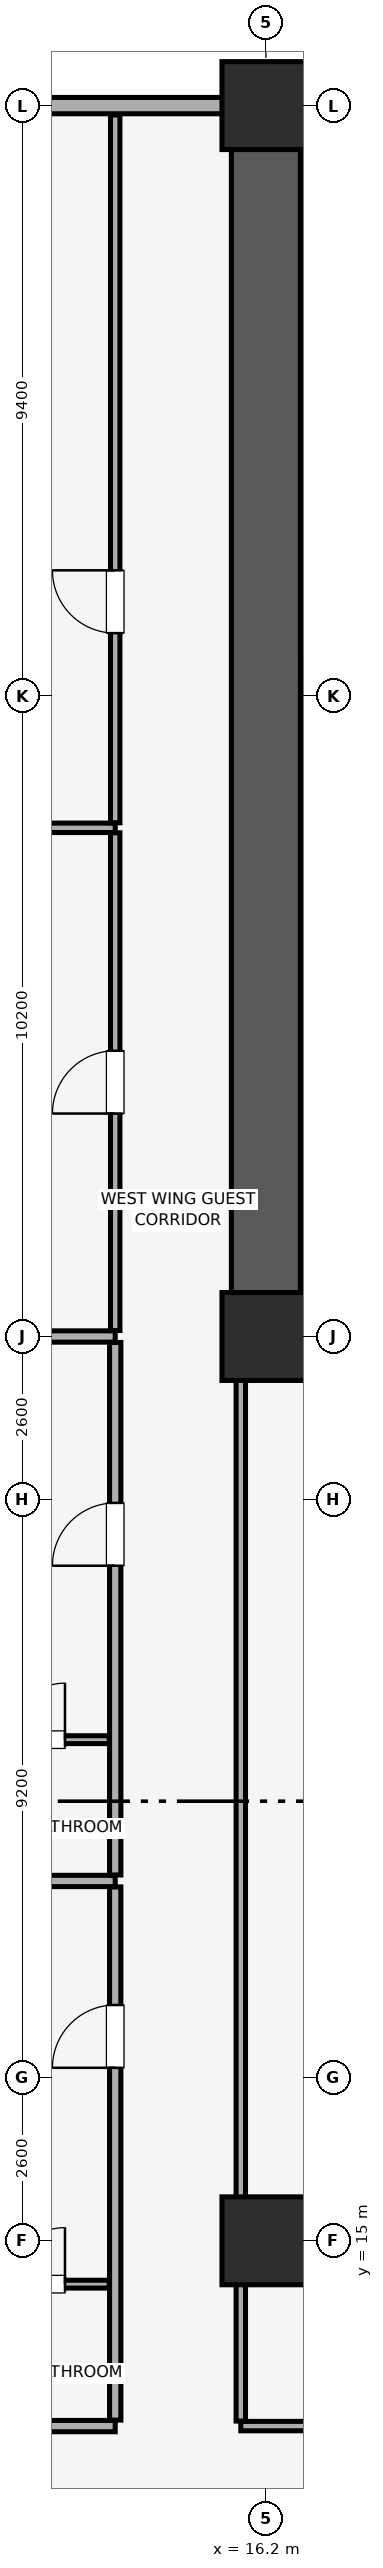
"""IFC4 building model, lengths in metres.
Left out: names, types, materials, properties, quantities, classifications, styles, units other than length and angle.
Written with IfcOpenShell. Run it as: python <this file> out.ifc"""

import sys

from ifc_helpers import new_model, si_unit, direction, frame, frame_2d, origin, origin_2d, place, context, subcontext, project, spatial, rectangle, extrude, element, fill, save


model = new_model("IFC4")
c1 = context("Model", 3, precision=1e-05, world=origin(), true_north=direction((0.0, 1.0)))
c2 = subcontext(c1, "Body", "Model", "MODEL_VIEW")
j1 = project(units=[si_unit("LENGTHUNIT", "METRE"), si_unit("PLANEANGLEUNIT", "RADIAN")], contexts=[c1])
p1 = place(None, origin())
s1 = spatial("IfcSite", under=j1, at=p1, CompositionType="ELEMENT")
p2 = place(p1, origin())
s2 = spatial("IfcBuilding", under=s1, at=p2, CompositionType="ELEMENT")
p3 = place(p2, frame((0.0, 0.0, 46.4)))
s3 = spatial("IfcBuildingStorey", under=s2, at=p3, CompositionType="ELEMENT", Elevation=46.4)
for number, where, z_axis, x_axis in (
    (1, (16.2, 15.0, 0.0), (0.0, 0.0, 1.0), (1.0, 0.0, 0.0)),
    (2, (16.2, 29.4, 0.0), (0.0, 0.0, 1.0), (1.0, 0.0, 0.0)),
    (3, (16.2, 49.0, 0.0), (0.0, 0.0, 1.0), (1.0, 0.0, 0.0)),
):
    element("IfcColumn", number, at=place(p3, frame(where, z_axis=z_axis, x_axis=x_axis)), inside=s3, PredefinedType="COLUMN", context=c2, shape_type="SweptSolid", body=[
        extrude(rectangle(XDim=1.4, YDim=1.4, at=origin_2d()), origin(), (0.0, 0.0, 1.0), 3.51),
    ])
p4 = place(p3, frame((79.8, 49.0, 0.0), z_axis=(0.0, 0.0, 1.0), x_axis=(-1.0, 0.0, 0.0)))
e4 = element("IfcWall", 4, at=p4, inside=s3, PredefinedType="SOLIDWALL", context=c2, shape_type="SweptSolid", body=[
    extrude(rectangle(XDim=75.6, YDim=0.26, at=frame_2d((37.8, 0.0))), origin(), (0.0, 0.0, 1.0), 2.56),
])
p5 = place(p4, frame((72.565, 0.0, 0.85)))
e5 = element("IfcOpeningElement", 5, at=p5, cuts=e4, PredefinedType="OPENING", context=c2, shape_type="SweptSolid", body=[
    extrude(rectangle(XDim=1.5, YDim=1.4, at=frame_2d((0.75, 0.7))), frame((0.0, 0.14, 0.0), z_axis=(0.0, -1.0, 0.0), x_axis=(1.0, 0.0, 0.0)), (0.0, 0.0, 1.0), 0.28),
])
p6 = place(p4, frame((67.45, 0.0, 0.85)))
e6 = element("IfcOpeningElement", 6, at=p6, cuts=e4, PredefinedType="OPENING", context=c2, shape_type="SweptSolid", body=[
    extrude(rectangle(XDim=1.5, YDim=1.4, at=frame_2d((0.75, 0.7))), frame((0.0, 0.14, 0.0), z_axis=(0.0, -1.0, 0.0), x_axis=(1.0, 0.0, 0.0)), (0.0, 0.0, 1.0), 0.28),
])
p7 = place(p4, frame((6.65, 0.0, 0.85)))
e7 = element("IfcOpeningElement", 7, at=p7, cuts=e4, PredefinedType="OPENING", context=c2, shape_type="SweptSolid", body=[
    extrude(rectangle(XDim=1.5, YDim=1.4, at=frame_2d((0.75, 0.7))), frame((0.0, 0.14, 0.0), z_axis=(0.0, -1.0, 0.0), x_axis=(1.0, 0.0, 0.0)), (0.0, 0.0, 1.0), 0.28),
])
p8 = place(p4, frame((1.535, 0.0, 0.85)))
e8 = element("IfcOpeningElement", 8, at=p8, cuts=e4, PredefinedType="OPENING", context=c2, shape_type="SweptSolid", body=[
    extrude(rectangle(XDim=1.5, YDim=1.4, at=frame_2d((0.75, 0.7))), frame((0.0, 0.14, 0.0), z_axis=(0.0, -1.0, 0.0), x_axis=(1.0, 0.0, 0.0)), (0.0, 0.0, 1.0), 0.28),
])
p9 = place(p4, frame((51.365, 0.0, 0.9)))
e9 = element("IfcOpeningElement", 9, at=p9, cuts=e4, PredefinedType="OPENING", context=c2, shape_type="SweptSolid", body=[
    extrude(rectangle(XDim=1.5, YDim=1.4, at=frame_2d((0.75, 0.7))), frame((0.0, 0.14, 0.0), z_axis=(0.0, -1.0, 0.0), x_axis=(1.0, 0.0, 0.0)), (0.0, 0.0, 1.0), 0.28),
])
p10 = place(p4, frame((44.55, 0.0, 0.9)))
e10 = element("IfcOpeningElement", 10, at=p10, cuts=e4, PredefinedType="OPENING", context=c2, shape_type="SweptSolid", body=[
    extrude(rectangle(XDim=1.5, YDim=1.4, at=frame_2d((0.75, 0.7))), frame((0.0, 0.14, 0.0), z_axis=(0.0, -1.0, 0.0), x_axis=(1.0, 0.0, 0.0)), (0.0, 0.0, 1.0), 0.28),
])
p11 = place(p4, frame((28.1, 0.0, 0.9)))
e11 = element("IfcOpeningElement", 11, at=p11, cuts=e4, PredefinedType="OPENING", context=c2, shape_type="SweptSolid", body=[
    extrude(rectangle(XDim=1.5, YDim=1.4, at=frame_2d((0.75, 0.7))), frame((0.0, 0.14, 0.0), z_axis=(0.0, -1.0, 0.0), x_axis=(1.0, 0.0, 0.0)), (0.0, 0.0, 1.0), 0.28),
])
p12 = place(p4, frame((23.485, 0.0, 0.9)))
e12 = element("IfcOpeningElement", 12, at=p12, cuts=e4, PredefinedType="OPENING", context=c2, shape_type="SweptSolid", body=[
    extrude(rectangle(XDim=1.5, YDim=1.4, at=frame_2d((0.75, 0.7))), frame((0.0, 0.14, 0.0), z_axis=(0.0, -1.0, 0.0), x_axis=(1.0, 0.0, 0.0)), (0.0, 0.0, 1.0), 0.28),
])
p13 = place(p3, frame((16.2, 29.4, 0.0), z_axis=(0.0, 0.0, 1.0), x_axis=(0.0, 1.0, 0.0)))
e13 = element("IfcWall", 13, at=p13, inside=s3, PredefinedType="SHEAR", context=c2, shape_type="SweptSolid", body=[
    extrude(rectangle(XDim=19.2, YDim=1.1, at=frame_2d((9.6, 0.0))), origin(), (0.0, 0.0, 1.0), 3.51),
])
p14 = place(p3, frame((16.755, 29.4, 0.0), z_axis=(0.0, 0.0, 1.0), x_axis=(1.0, 0.0, 0.0)))
e14 = element("IfcWall", 14, at=p14, inside=s3, PredefinedType="SHEAR", context=c2, shape_type="SweptSolid", body=[
    extrude(rectangle(XDim=6.845, YDim=1.1, at=frame_2d((3.423, 0.0))), origin(), (0.0, 0.0, 1.0), 3.51),
])
p15 = place(p3, frame((16.755, 40.025, 0.0), z_axis=(0.0, 0.0, 1.0), x_axis=(1.0, 0.0, 0.0)))
e15 = element("IfcWall", 15, at=p15, inside=s3, PredefinedType="SHEAR", context=c2, shape_type="SweptSolid", body=[
    extrude(rectangle(XDim=4.1, YDim=0.35, at=frame_2d((2.05, 0.0))), origin(), (0.0, 0.0, 1.0), 3.51),
])
p16 = place(p15, frame((1.71, 0.0, 0.0)))
e16 = element("IfcOpeningElement", 16, at=p16, cuts=e15, PredefinedType="OPENING", context=c2, shape_type="SweptSolid", body=[
    extrude(rectangle(XDim=1.15, YDim=2.15, at=frame_2d((0.575, 1.075))), frame((0.0, 0.185, 0.0), z_axis=(0.0, -1.0, 0.0), x_axis=(1.0, 0.0, 0.0)), (0.0, 0.0, 1.0), 0.37),
])
p17 = place(p3, frame((15.8, 12.05, 0.0), z_axis=(0.0, 0.0, 1.0), x_axis=(1.0, 0.0, 0.0)))
e17 = element("IfcWall", 17, at=p17, inside=s3, PredefinedType="PARTITIONING", context=c2, shape_type="SweptSolid", body=[
    extrude(rectangle(XDim=9.2, YDim=0.15, at=frame_2d((4.6, 0.0))), origin(), (0.0, 0.0, 1.0), 3.51),
])
p18 = place(p17, frame((4.1, 0.0, 0.0)))
e18 = element("IfcOpeningElement", 18, at=p18, cuts=e17, PredefinedType="OPENING", context=c2, shape_type="SweptSolid", body=[
    extrude(rectangle(XDim=1.0, YDim=2.15, at=frame_2d((0.5, 1.075))), frame((0.0, 0.085, 0.0), z_axis=(0.0, -1.0, 0.0), x_axis=(1.0, 0.0, 0.0)), (0.0, 0.0, 1.0), 0.17),
])
p19 = place(p3, frame((15.8, 12.13, 0.0), z_axis=(0.0, 0.0, 1.0), x_axis=(0.0, 1.0, 0.0)))
e19 = element("IfcWall", 19, at=p19, inside=s3, PredefinedType="PARTITIONING", context=c2, shape_type="SweptSolid", body=[
    extrude(rectangle(XDim=17.26, YDim=0.15, at=frame_2d((8.63, 0.0))), origin(), (0.0, 0.0, 1.0), 3.51),
])
for number, where, z_axis, x_axis in (
    (20, (0.15, 12.05, 0.0), (0.0, 0.0, 1.0), (1.0, 0.0, 0.0)),
    (21, (0.15, 20.73, 0.0), (0.0, 0.0, 1.0), (1.0, 0.0, 0.0)),
):
    element("IfcWall", number, at=place(p3, frame(where, z_axis=z_axis, x_axis=x_axis)), inside=s3, PredefinedType="PARTITIONING", context=c2, shape_type="SweptSolid", body=[
        extrude(rectangle(XDim=13.65, YDim=0.18, at=frame_2d((6.825, 0.0))), origin(), (0.0, 0.0, 1.0), 3.51),
    ])
p20 = place(p3, frame((13.8, 12.145, 0.0), z_axis=(0.0, 0.0, 1.0), x_axis=(0.0, 1.0, 0.0)))
e22 = element("IfcWall", 22, at=p20, inside=s3, PredefinedType="PARTITIONING", context=c2, shape_type="SweptSolid", body=[
    extrude(rectangle(XDim=8.49, YDim=0.18, at=frame_2d((4.245, 0.0))), origin(), (0.0, 0.0, 1.0), 3.51),
])
p21 = place(p20, frame((5.61, 0.0, 0.0)))
e23 = element("IfcOpeningElement", 23, at=p21, cuts=e22, PredefinedType="OPENING", context=c2, shape_type="SweptSolid", body=[
    extrude(rectangle(XDim=1.0, YDim=2.15, at=frame_2d((0.5, 1.075))), frame((0.0, 0.1, 0.0), z_axis=(0.0, -1.0, 0.0), x_axis=(1.0, 0.0, 0.0)), (0.0, 0.0, 1.0), 0.2),
])
p22 = place(p3, frame((11.3, 14.31, 0.0), z_axis=(0.0, 0.0, 1.0), x_axis=(1.0, 0.0, 0.0)))
e24 = element("IfcWall", 24, at=p22, inside=s3, PredefinedType="PARTITIONING", context=c2, shape_type="SweptSolid", body=[
    extrude(rectangle(XDim=2.405, YDim=0.125, at=frame_2d((1.203, 0.0))), origin(), (0.0, 0.0, 1.0), 3.51),
])
p23 = place(p22, frame((0.8, 0.0, 0.0)))
e25 = element("IfcOpeningElement", 25, at=p23, cuts=e24, PredefinedType="OPENING", context=c2, shape_type="SweptSolid", body=[
    extrude(rectangle(XDim=0.9, YDim=2.1, at=frame_2d((0.45, 1.05))), frame((0.0, 0.073, 0.0), z_axis=(0.0, -1.0, 0.0), x_axis=(1.0, 0.0, 0.0)), (0.0, 0.0, 1.0), 0.145),
])
p24 = place(p3, frame((0.15, 29.4, 0.0), z_axis=(0.0, 0.0, 1.0), x_axis=(1.0, 0.0, 0.0)))
e26 = element("IfcWall", 26, at=p24, inside=s3, PredefinedType="PARTITIONING", context=c2, shape_type="SweptSolid", body=[
    extrude(rectangle(XDim=13.65, YDim=0.18, at=frame_2d((6.825, 0.0))), origin(), (0.0, 0.0, 1.0), 2.86),
])
p25 = place(p3, frame((13.8, 20.825, 0.0), z_axis=(0.0, 0.0, 1.0), x_axis=(0.0, 1.0, 0.0)))
e27 = element("IfcWall", 27, at=p25, inside=s3, PredefinedType="PARTITIONING", context=c2, shape_type="SweptSolid", body=[
    extrude(rectangle(XDim=8.48, YDim=0.18, at=frame_2d((4.24, 0.0))), origin(), (0.0, 0.0, 1.0), 3.51),
])
p26 = place(p25, frame((4.925, 0.0, 0.0)))
e28 = element("IfcOpeningElement", 28, at=p26, cuts=e27, PredefinedType="OPENING", context=c2, shape_type="SweptSolid", body=[
    extrude(rectangle(XDim=1.0, YDim=2.15, at=frame_2d((0.5, 1.075))), frame((0.0, 0.1, 0.0), z_axis=(0.0, -1.0, 0.0), x_axis=(1.0, 0.0, 0.0)), (0.0, 0.0, 1.0), 0.2),
])
p27 = place(p3, frame((11.3, 22.98, 0.0), z_axis=(0.0, 0.0, 1.0), x_axis=(1.0, 0.0, 0.0)))
e29 = element("IfcWall", 29, at=p27, inside=s3, PredefinedType="PARTITIONING", context=c2, shape_type="SweptSolid", body=[
    extrude(rectangle(XDim=2.405, YDim=0.125, at=frame_2d((1.203, 0.0))), origin(), (0.0, 0.0, 1.0), 3.51),
])
p28 = place(p27, frame((0.8, 0.0, 0.0)))
e30 = element("IfcOpeningElement", 30, at=p28, cuts=e29, PredefinedType="OPENING", context=c2, shape_type="SweptSolid", body=[
    extrude(rectangle(XDim=0.9, YDim=2.1, at=frame_2d((0.45, 1.05))), frame((0.0, 0.073, 0.0), z_axis=(0.0, -1.0, 0.0), x_axis=(1.0, 0.0, 0.0)), (0.0, 0.0, 1.0), 0.145),
])
p29 = place(p3, frame((0.15, 37.5, 0.0), z_axis=(0.0, 0.0, 1.0), x_axis=(1.0, 0.0, 0.0)))
e31 = element("IfcWall", 31, at=p29, inside=s3, PredefinedType="PARTITIONING", context=c2, shape_type="SweptSolid", body=[
    extrude(rectangle(XDim=13.65, YDim=0.15, at=frame_2d((6.825, 0.0))), origin(), (0.0, 0.0, 1.0), 3.51),
])
p30 = place(p3, frame((13.8, 29.495, 0.0), z_axis=(0.0, 0.0, 1.0), x_axis=(0.0, 1.0, 0.0)))
e32 = element("IfcWall", 32, at=p30, inside=s3, PredefinedType="PARTITIONING", context=c2, shape_type="SweptSolid", body=[
    extrude(rectangle(XDim=7.925, YDim=0.15, at=frame_2d((3.962, 0.0))), origin(), (0.0, 0.0, 1.0), 3.51),
])
p31 = place(p30, frame((3.455, 0.0, 0.0)))
e33 = element("IfcOpeningElement", 33, at=p31, cuts=e32, PredefinedType="OPENING", context=c2, shape_type="SweptSolid", body=[
    extrude(rectangle(XDim=1.0, YDim=2.15, at=frame_2d((0.5, 1.075))), frame((0.0, 0.085, 0.0), z_axis=(0.0, -1.0, 0.0), x_axis=(1.0, 0.0, 0.0)), (0.0, 0.0, 1.0), 0.17),
])
p32 = place(p3, frame((13.8, 37.58, 0.0), z_axis=(0.0, 0.0, 1.0), x_axis=(0.0, 1.0, 0.0)))
e34 = element("IfcWall", 34, at=p32, inside=s3, PredefinedType="PARTITIONING", context=c2, shape_type="SweptSolid", body=[
    extrude(rectangle(XDim=11.27, YDim=0.15, at=frame_2d((5.635, 0.0))), origin(), (0.0, 0.0, 1.0), 3.51),
])
p33 = place(p32, frame((3.02, 0.0, 0.0)))
e35 = element("IfcOpeningElement", 35, at=p33, cuts=e34, PredefinedType="OPENING", context=c2, shape_type="SweptSolid", body=[
    extrude(rectangle(XDim=1.0, YDim=2.15, at=frame_2d((0.5, 1.075))), frame((0.0, 0.085, 0.0), z_axis=(0.0, -1.0, 0.0), x_axis=(1.0, 0.0, 0.0)), (0.0, 0.0, 1.0), 0.17),
])
p34 = place(p21, origin())
e36 = element("IfcDoor", 36, at=p34, inside=s3, OperationType="SINGLE_SWING_LEFT", PredefinedType="DOOR", context=c2, shape_type="SweptSolid", body=[
    extrude(rectangle(XDim=1.0, YDim=2.15, at=frame_2d((0.5, 1.075))), frame((0.0, 0.025, 0.0), z_axis=(0.0, -1.0, 0.0), x_axis=(1.0, 0.0, 0.0)), (0.0, 0.0, 1.0), 0.05),
])
fill(e23, e36)
p35 = place(p23, origin())
e37 = element("IfcDoor", 37, at=p35, inside=s3, OperationType="SINGLE_SWING_RIGHT", PredefinedType="DOOR", context=c2, shape_type="SweptSolid", body=[
    extrude(rectangle(XDim=0.9, YDim=2.1, at=frame_2d((0.45, 1.05))), frame((0.0, 0.025, 0.0), z_axis=(0.0, -1.0, 0.0), x_axis=(1.0, 0.0, 0.0)), (0.0, 0.0, 1.0), 0.05),
])
fill(e25, e37)
p36 = place(p26, origin())
e38 = element("IfcDoor", 38, at=p36, inside=s3, OperationType="SINGLE_SWING_LEFT", PredefinedType="DOOR", context=c2, shape_type="SweptSolid", body=[
    extrude(rectangle(XDim=1.0, YDim=2.15, at=frame_2d((0.5, 1.075))), frame((0.0, 0.025, 0.0), z_axis=(0.0, -1.0, 0.0), x_axis=(1.0, 0.0, 0.0)), (0.0, 0.0, 1.0), 0.05),
])
fill(e28, e38)
p37 = place(p28, origin())
e39 = element("IfcDoor", 39, at=p37, inside=s3, OperationType="SINGLE_SWING_RIGHT", PredefinedType="DOOR", context=c2, shape_type="SweptSolid", body=[
    extrude(rectangle(XDim=0.9, YDim=2.1, at=frame_2d((0.45, 1.05))), frame((0.0, 0.025, 0.0), z_axis=(0.0, -1.0, 0.0), x_axis=(1.0, 0.0, 0.0)), (0.0, 0.0, 1.0), 0.05),
])
fill(e30, e39)
p38 = place(p31, origin())
e40 = element("IfcDoor", 40, at=p38, inside=s3, OperationType="SINGLE_SWING_LEFT", PredefinedType="DOOR", context=c2, shape_type="SweptSolid", body=[
    extrude(rectangle(XDim=1.0, YDim=2.15, at=frame_2d((0.5, 1.075))), frame((0.0, 0.025, 0.0), z_axis=(0.0, -1.0, 0.0), x_axis=(1.0, 0.0, 0.0)), (0.0, 0.0, 1.0), 0.05),
])
fill(e33, e40)
p39 = place(p33, origin())
e41 = element("IfcDoor", 41, at=p39, inside=s3, OperationType="SINGLE_SWING_RIGHT", PredefinedType="DOOR", context=c2, shape_type="SweptSolid", body=[
    extrude(rectangle(XDim=1.0, YDim=2.15, at=frame_2d((0.5, 1.075))), frame((0.0, 0.025, 0.0), z_axis=(0.0, -1.0, 0.0), x_axis=(1.0, 0.0, 0.0)), (0.0, 0.0, 1.0), 0.05),
])
fill(e35, e41)
save(model, sys.argv[1])
